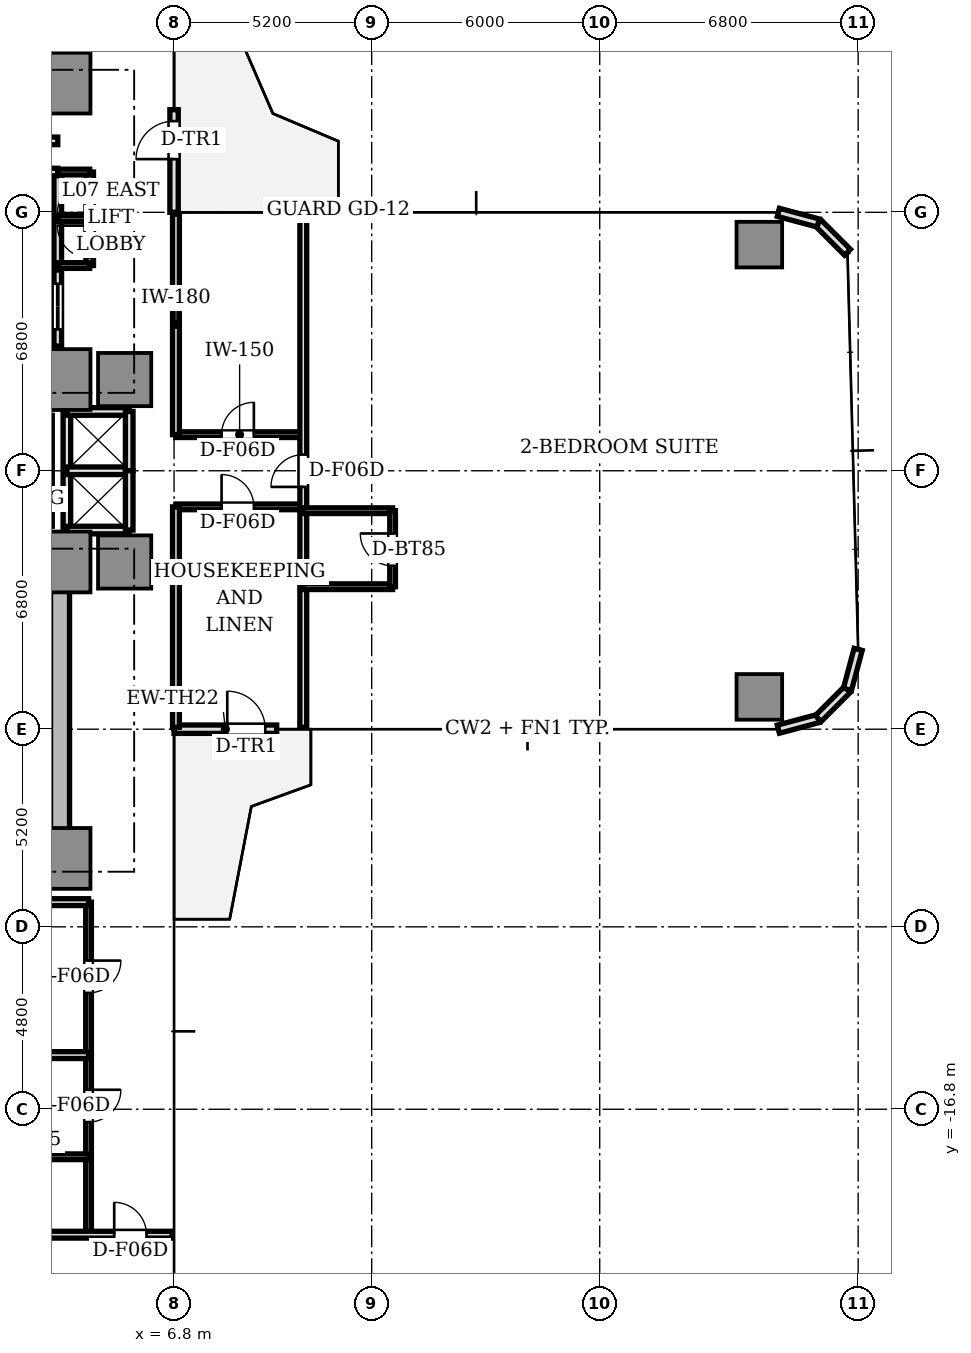
"""IFC4 building model, lengths in metres.
Left out: names, types, materials, properties, quantities, classifications, styles, units other than length and angle.
Written with IfcOpenShell. Run it as: python <this file> out.ifc"""

import sys

from ifc_helpers import new_model, si_unit, direction, frame, frame_2d, origin, origin_2d, place, context, subcontext, project, spatial, rectangle, extrude, source, transform, mapped, element, fill, save


model = new_model("IFC4")
c1 = context("Model", 3, precision=1e-05, world=origin(), true_north=direction((0.0, 1.0)))
c2 = subcontext(c1, "Body", "Model", "MODEL_VIEW")
j1 = project(units=[si_unit("LENGTHUNIT", "METRE"), si_unit("PLANEANGLEUNIT", "RADIAN")], contexts=[c1])
p1 = place(None, origin())
s1 = spatial("IfcSite", under=j1, at=p1, CompositionType="ELEMENT")
p2 = place(p1, origin())
s2 = spatial("IfcBuilding", under=s1, at=p2, CompositionType="ELEMENT")
p3 = place(p2, frame((0.0, 0.0, 29.8)))
s3 = spatial("IfcBuildingStorey", under=s2, at=p3, CompositionType="ELEMENT", Elevation=29.8)
p4 = place(p3, frame((3.8, -9.75, 0.0), z_axis=(0.0, 0.0, 1.0), x_axis=(0.0, 1.0, 0.0)))
e1 = element("IfcWall", 1, at=p4, inside=s3, PredefinedType="SHEAR", context=c2, shape_type="SweptSolid", body=[
    extrude(rectangle(XDim=6.9, YDim=0.5, at=frame_2d((3.45, 0.0))), origin(), (0.0, 0.0, 1.0), 3.11),
])
m1 = source(origin(), c2, "Body", "SweptSolid", [
    extrude(rectangle(XDim=1.6, YDim=1.6, at=origin_2d()), origin(), (0.0, 0.0, 1.0), 3.11),
])
for number, where, z_axis, x_axis in (
    (2, (3.8, 2.4, 0.0), (0.0, 0.0, 1.0), (1.0, 0.0, 0.0)),
    (3, (3.8, 10.2, 0.0), (0.0, 0.0, 1.0), (1.0, 0.0, 0.0)),
    (4, (3.8, -2.4, 0.0), (0.0, 0.0, 1.0), (1.0, 0.0, 0.0)),
    (5, (3.8, -10.2, 0.0), (0.0, 0.0, 1.0), (1.0, 0.0, 0.0)),
):
    element("IfcColumn", number, at=place(p3, frame(where, z_axis=z_axis, x_axis=x_axis)), inside=s3, PredefinedType="COLUMN", context=c2, shape_type="MappedRepresentation", body=[
        mapped(m1, transform((0.0, 0.0, 0.0), scale=1.0)),
    ])
m2 = source(origin(), c2, "Body", "SweptSolid", [
    extrude(rectangle(XDim=1.4, YDim=1.4, at=origin_2d()), origin(), (0.0, 0.0, 1.0), 3.11),
])
for number, where, z_axis, x_axis in (
    (6, (5.5, 2.4, 0.0), (0.0, 0.0, 1.0), (1.0, 0.0, 0.0)),
    (7, (5.5, -2.4, 0.0), (0.0, 0.0, 1.0), (1.0, 0.0, 0.0)),
):
    element("IfcColumn", number, at=place(p3, frame(where, z_axis=z_axis, x_axis=x_axis)), inside=s3, PredefinedType="COLUMN", context=c2, shape_type="MappedRepresentation", body=[
        mapped(m2, transform((0.0, 0.0, 0.0), scale=1.0)),
    ])
m3 = source(origin(), c2, "Body", "SweptSolid", [
    extrude(rectangle(XDim=1.2, YDim=1.2, at=origin_2d()), origin(), (0.0, 0.0, 1.0), 3.11),
])
for number, where, z_axis, x_axis in (
    (8, (22.2, -5.95, 0.0), (0.0, 0.0, 1.0), (1.0, 0.0, 0.0)),
    (9, (22.2, 5.95, 0.0), (0.0, 0.0, 1.0), (1.0, 0.0, 0.0)),
):
    element("IfcColumn", number, at=place(p3, frame(where, z_axis=z_axis, x_axis=x_axis)), inside=s3, PredefinedType="COLUMN", context=c2, shape_type="MappedRepresentation", body=[
        mapped(m3, transform((0.0, 0.0, 0.0), scale=1.0)),
    ])
p5 = place(p3, frame((6.8, -6.8, 0.0), z_axis=(0.0, 0.0, 1.0), x_axis=(1.0, 0.0, 0.0)))
e10 = element("IfcWall", 10, at=p5, inside=s3, PredefinedType="STANDARD", context=c2, shape_type="SweptSolid", body=[
    extrude(rectangle(XDim=2.7, YDim=0.22, at=frame_2d((1.35, 0.0))), origin(), (0.0, 0.0, 1.0), 3.11),
])
p6 = place(p5, frame((1.4, 0.0, 0.0)))
e11 = element("IfcOpeningElement", 11, at=p6, cuts=e10, PredefinedType="OPENING", context=c2, shape_type="SweptSolid", body=[
    extrude(rectangle(XDim=1.0, YDim=2.2, at=frame_2d((0.5, 1.1))), frame((0.0, 0.12, 0.0), z_axis=(0.0, -1.0, 0.0), x_axis=(1.0, 0.0, 0.0)), (0.0, 0.0, 1.0), 0.24),
])
for number, where, z_axis, x_axis in (
    (12, (22.7, -6.8, 0.0), (0.0, 0.0, 1.0), (0.966, 0.259, 0.0)),
    (13, (23.75, -6.519, 0.0), (0.0, 0.0, 1.0), (0.707, 0.707, 0.0)),
    (14, (24.519, -5.75, 0.0), (0.0, 0.0, 1.0), (0.259, 0.966, 0.0)),
    (15, (24.519, 5.75, 0.0), (0.0, 0.0, 1.0), (-0.707, 0.707, 0.0)),
    (16, (23.75, 6.519, 0.0), (0.0, 0.0, 1.0), (-0.966, 0.259, 0.0)),
):
    element("IfcWall", number, at=place(p3, frame(where, z_axis=z_axis, x_axis=x_axis)), inside=s3, PredefinedType="STANDARD", context=c2, shape_type="SweptSolid", body=[
        extrude(rectangle(XDim=1.087, YDim=0.22, at=frame_2d((0.543, 0.0))), origin(), (0.0, 0.0, 1.0), 3.11),
    ])
p7 = place(p3, frame((6.8, 6.8, 0.0), z_axis=(0.0, 0.0, 1.0), x_axis=(0.0, 1.0, 0.0)))
e17 = element("IfcWall", 17, at=p7, inside=s3, PredefinedType="STANDARD", context=c2, shape_type="SweptSolid", body=[
    extrude(rectangle(XDim=2.7, YDim=0.22, at=frame_2d((1.35, 0.0))), origin(), (0.0, 0.0, 1.0), 3.11),
])
p8 = place(p7, frame((1.4, 0.0, 0.0)))
e18 = element("IfcOpeningElement", 18, at=p8, cuts=e17, PredefinedType="OPENING", context=c2, shape_type="SweptSolid", body=[
    extrude(rectangle(XDim=1.0, YDim=2.2, at=frame_2d((0.5, 1.1))), frame((0.0, 0.12, 0.0), z_axis=(0.0, -1.0, 0.0), x_axis=(1.0, 0.0, 0.0)), (0.0, 0.0, 1.0), 0.24),
])
p9 = place(p3, frame((0.0, -2.5, 0.0), z_axis=(0.0, 0.0, 1.0), x_axis=(1.0, 0.0, 0.0)))
e19 = element("IfcWall", 19, at=p9, inside=s3, PredefinedType="SOLIDWALL", context=c2, shape_type="SweptSolid", body=[
    extrude(rectangle(XDim=3.72, YDim=0.2, at=frame_2d((1.86, 0.0))), origin(), (0.0, 0.0, 1.0), 3.11),
])
p10 = place(p3, frame((3.74, 3.28, 0.0), z_axis=(0.0, 0.0, 1.0), x_axis=(0.0, 1.0, 0.0)))
e20 = element("IfcWall", 20, at=p10, inside=s3, PredefinedType="SOLIDWALL", context=c2, shape_type="SweptSolid", body=[
    extrude(rectangle(XDim=2.08, YDim=0.2, at=frame_2d((1.04, 0.0))), origin(), (0.0, 0.0, 1.0), 2.66),
])
p11 = place(p10, frame((0.44, 0.0, 0.0)))
e21 = element("IfcOpeningElement", 21, at=p11, cuts=e20, PredefinedType="OPENING", context=c2, shape_type="SweptSolid", body=[
    extrude(rectangle(XDim=1.2, YDim=2.2, at=frame_2d((0.6, 1.1))), frame((0.0, 0.11, 0.0), z_axis=(0.0, -1.0, 0.0), x_axis=(1.0, 0.0, 0.0)), (0.0, 0.0, 1.0), 0.22),
])
p12 = place(p3, frame((0.05, 5.38, 0.0), z_axis=(0.0, 0.0, 1.0), x_axis=(1.0, 0.0, 0.0)))
e22 = element("IfcWall", 22, at=p12, inside=s3, PredefinedType="SOLIDWALL", context=c2, shape_type="SweptSolid", body=[
    extrude(rectangle(XDim=3.69, YDim=0.2, at=frame_2d((1.845, 0.0))), origin(), (0.0, 0.0, 1.0), 2.66),
])
p13 = place(p3, frame((3.74, 5.38, 0.0), z_axis=(0.0, 0.0, 1.0), x_axis=(0.0, 1.0, 0.0)))
e23 = element("IfcWall", 23, at=p13, inside=s3, PredefinedType="SOLIDWALL", context=c2, shape_type="SweptSolid", body=[
    extrude(rectangle(XDim=2.48, YDim=0.2, at=frame_2d((1.24, 0.0))), origin(), (0.0, 0.0, 1.0), 2.66),
])
p14 = place(p3, frame((1.9, 7.86, 0.0), z_axis=(0.0, 0.0, 1.0), x_axis=(1.0, 0.0, 0.0)))
e24 = element("IfcWall", 24, at=p14, inside=s3, PredefinedType="SOLIDWALL", context=c2, shape_type="SweptSolid", body=[
    extrude(rectangle(XDim=1.84, YDim=0.2, at=frame_2d((0.92, 0.0))), origin(), (0.0, 0.0, 1.0), 2.66),
])
p15 = place(p14, frame((0.36, 0.0, 0.0)))
e25 = element("IfcOpeningElement", 25, at=p15, cuts=e24, PredefinedType="OPENING", context=c2, shape_type="SweptSolid", body=[
    extrude(rectangle(XDim=1.1, YDim=2.2, at=frame_2d((0.55, 1.1))), frame((0.0, 0.11, 0.0), z_axis=(0.0, -1.0, 0.0), x_axis=(1.0, 0.0, 0.0)), (0.0, 0.0, 1.0), 0.22),
])
p16 = place(p3, frame((3.98, -1.56, 0.0), z_axis=(0.0, 0.0, 1.0), x_axis=(0.0, 1.0, 0.0)))
e26 = element("IfcWall", 26, at=p16, inside=s3, PredefinedType="SOLIDWALL", context=c2, shape_type="SweptSolid", body=[
    extrude(rectangle(XDim=3.12, YDim=0.2, at=frame_2d((1.56, 0.0))), origin(), (0.0, 0.0, 1.0), 2.18),
])
for number, where, z_axis, x_axis in (
    (27, (3.98, 1.56, 0.0), (0.0, 0.0, 1.0), (1.0, 0.0, 0.0)),
    (28, (3.98, -1.56, 0.0), (0.0, 0.0, 1.0), (1.0, 0.0, 0.0)),
    (29, (3.98, 0.0, 0.0), (0.0, 0.0, 1.0), (1.0, 0.0, 0.0)),
):
    element("IfcWall", number, at=place(p3, frame(where, z_axis=z_axis, x_axis=x_axis)), inside=s3, PredefinedType="SOLIDWALL", context=c2, shape_type="SweptSolid", body=[
        extrude(rectangle(XDim=1.64, YDim=0.2, at=frame_2d((0.82, 0.0))), origin(), (0.0, 0.0, 1.0), 2.66),
    ])
for number, where, z_axis, x_axis in (
    (30, (5.62, 0.0, 0.0), (0.0, 0.0, 1.0), (0.0, 1.0, 0.0)),
    (31, (5.62, -1.56, 0.0), (0.0, 0.0, 1.0), (0.0, 1.0, 0.0)),
):
    element("IfcWall", number, at=place(p3, frame(where, z_axis=z_axis, x_axis=x_axis)), inside=s3, PredefinedType="SOLIDWALL", context=c2, shape_type="SweptSolid", body=[
        extrude(rectangle(XDim=1.56, YDim=0.2, at=frame_2d((0.78, 0.0))), origin(), (0.0, 0.0, 1.0), 2.66),
    ])
p17 = place(p3, frame((0.12, 8.68, 0.0), z_axis=(0.0, 0.0, 1.0), x_axis=(1.0, 0.0, 0.0)))
e32 = element("IfcWall", 32, at=p17, inside=s3, PredefinedType="SOLIDWALL", context=c2, shape_type="SweptSolid", body=[
    extrude(rectangle(XDim=3.62, YDim=0.2, at=frame_2d((1.81, 0.0))), origin(), (0.0, 0.0, 1.0), 2.66),
])
p18 = place(p17, frame((1.75, 0.0, 0.0)))
e33 = element("IfcOpeningElement", 33, at=p18, cuts=e32, PredefinedType="OPENING", context=c2, shape_type="SweptSolid", body=[
    extrude(rectangle(XDim=0.95, YDim=2.15, at=frame_2d((0.475, 1.075))), frame((0.0, 0.11, 0.0), z_axis=(0.0, -1.0, 0.0), x_axis=(1.0, 0.0, 0.0)), (0.0, 0.0, 1.0), 0.22),
])
p19 = place(p3, frame((4.58, 5.4, 0.0), z_axis=(0.0, 0.0, 1.0), x_axis=(0.0, 1.0, 0.0)))
e34 = element("IfcWall", 34, at=p19, inside=s3, PredefinedType="SOLIDWALL", context=c2, shape_type="SweptSolid", body=[
    extrude(rectangle(XDim=2.46, YDim=0.2, at=frame_2d((1.23, 0.0))), origin(), (0.0, 0.0, 1.0), 2.66),
])
p20 = place(p19, frame((0.2, 0.0, 0.0)))
e35 = element("IfcOpeningElement", 35, at=p20, cuts=e34, PredefinedType="OPENING", context=c2, shape_type="SweptSolid", body=[
    extrude(rectangle(XDim=0.85, YDim=2.1, at=frame_2d((0.425, 1.05))), frame((0.0, 0.11, 0.0), z_axis=(0.0, -1.0, 0.0), x_axis=(1.0, 0.0, 0.0)), (0.0, 0.0, 1.0), 0.22),
])
p21 = place(p19, frame((1.38, 0.0, 0.0)))
e36 = element("IfcOpeningElement", 36, at=p21, cuts=e34, PredefinedType="OPENING", context=c2, shape_type="SweptSolid", body=[
    extrude(rectangle(XDim=0.85, YDim=2.1, at=frame_2d((0.425, 1.05))), frame((0.0, 0.11, 0.0), z_axis=(0.0, -1.0, 0.0), x_axis=(1.0, 0.0, 0.0)), (0.0, 0.0, 1.0), 0.22),
])
for number, where, z_axis, x_axis in (
    (37, (3.74, 5.4, 0.0), (0.0, 0.0, 1.0), (1.0, 0.0, 0.0)),
    (38, (3.74, 7.86, 0.0), (0.0, 0.0, 1.0), (1.0, 0.0, 0.0)),
    (39, (3.74, 6.63, 0.0), (0.0, 0.0, 1.0), (1.0, 0.0, 0.0)),
):
    element("IfcWall", number, at=place(p3, frame(where, z_axis=z_axis, x_axis=x_axis)), inside=s3, PredefinedType="PARTITIONING", context=c2, shape_type="SweptSolid", body=[
        extrude(rectangle(XDim=0.84, YDim=0.15, at=frame_2d((0.42, 0.0))), origin(), (0.0, 0.0, 1.0), 2.66),
    ])
p22 = place(p3, frame((6.85, 0.95, 0.0), z_axis=(0.0, 0.0, 1.0), x_axis=(1.0, 0.0, 0.0)))
e40 = element("IfcWall", 40, at=p22, inside=s3, PredefinedType="PARTITIONING", context=c2, shape_type="SweptSolid", body=[
    extrude(rectangle(XDim=3.35, YDim=0.15, at=frame_2d((1.675, 0.0))), origin(), (0.0, 0.0, 1.0), 2.66),
])
p23 = place(p22, frame((1.2, 0.0, 0.0)))
e41 = element("IfcOpeningElement", 41, at=p23, cuts=e40, PredefinedType="OPENING", context=c2, shape_type="SweptSolid", body=[
    extrude(rectangle(XDim=0.85, YDim=2.1, at=frame_2d((0.425, 1.05))), frame((0.0, 0.085, 0.0), z_axis=(0.0, -1.0, 0.0), x_axis=(1.0, 0.0, 0.0)), (0.0, 0.0, 1.0), 0.17),
])
p24 = place(p3, frame((6.85, -0.95, 0.0), z_axis=(0.0, 0.0, 1.0), x_axis=(1.0, 0.0, 0.0)))
e42 = element("IfcWall", 42, at=p24, inside=s3, PredefinedType="PARTITIONING", context=c2, shape_type="SweptSolid", body=[
    extrude(rectangle(XDim=3.35, YDim=0.15, at=frame_2d((1.675, 0.0))), origin(), (0.0, 0.0, 1.0), 2.66),
])
p25 = place(p24, frame((1.2, 0.0, 0.0)))
e43 = element("IfcOpeningElement", 43, at=p25, cuts=e42, PredefinedType="OPENING", context=c2, shape_type="SweptSolid", body=[
    extrude(rectangle(XDim=0.85, YDim=2.1, at=frame_2d((0.425, 1.05))), frame((0.0, 0.085, 0.0), z_axis=(0.0, -1.0, 0.0), x_axis=(1.0, 0.0, 0.0)), (0.0, 0.0, 1.0), 0.17),
])
for number, where, z_axis, x_axis in (
    (44, (6.85, 0.95, 0.0), (0.0, 0.0, 1.0), (0.0, 1.0, 0.0)),
    (45, (6.85, -6.75, 0.0), (0.0, 0.0, 1.0), (0.0, 1.0, 0.0)),
):
    element("IfcWall", number, at=place(p3, frame(where, z_axis=z_axis, x_axis=x_axis)), inside=s3, PredefinedType="PARTITIONING", context=c2, shape_type="SweptSolid", body=[
        extrude(rectangle(XDim=5.8, YDim=0.18, at=frame_2d((2.9, 0.0))), origin(), (0.0, 0.0, 1.0), 2.66),
    ])
p26 = place(p3, frame((10.2, -6.75, 0.0), z_axis=(0.0, 0.0, 1.0), x_axis=(0.0, 1.0, 0.0)))
e46 = element("IfcWall", 46, at=p26, inside=s3, PredefinedType="PARTITIONING", context=c2, shape_type="SweptSolid", body=[
    extrude(rectangle(XDim=13.5, YDim=0.18, at=frame_2d((6.75, 0.0))), origin(), (0.0, 0.0, 1.0), 2.66),
])
p27 = place(p26, frame((6.325, 0.0, 0.0)))
e47 = element("IfcOpeningElement", 47, at=p27, cuts=e46, PredefinedType="OPENING", context=c2, shape_type="SweptSolid", body=[
    extrude(rectangle(XDim=0.85, YDim=2.1, at=frame_2d((0.425, 1.05))), frame((0.0, 0.1, 0.0), z_axis=(0.0, -1.0, 0.0), x_axis=(1.0, 0.0, 0.0)), (0.0, 0.0, 1.0), 0.2),
])
p28 = place(p3, frame((10.2, -1.05, 0.0), z_axis=(0.0, 0.0, 1.0), x_axis=(1.0, 0.0, 0.0)))
e48 = element("IfcWall", 48, at=p28, inside=s3, PredefinedType="PARTITIONING", context=c2, shape_type="SweptSolid", body=[
    extrude(rectangle(XDim=2.35, YDim=0.15, at=frame_2d((1.175, 0.0))), origin(), (0.0, 0.0, 1.0), 2.66),
])
p29 = place(p3, frame((10.2, -3.05, 0.0), z_axis=(0.0, 0.0, 1.0), x_axis=(1.0, 0.0, 0.0)))
e49 = element("IfcWall", 49, at=p29, inside=s3, PredefinedType="PARTITIONING", context=c2, shape_type="SweptSolid", body=[
    extrude(rectangle(XDim=2.35, YDim=0.15, at=frame_2d((1.175, 0.0))), origin(), (0.0, 0.0, 1.0), 2.63),
])
p30 = place(p3, frame((12.55, -3.05, 0.0), z_axis=(0.0, 0.0, 1.0), x_axis=(0.0, 1.0, 0.0)))
e50 = element("IfcWall", 50, at=p30, inside=s3, PredefinedType="PARTITIONING", context=c2, shape_type="SweptSolid", body=[
    extrude(rectangle(XDim=2.0, YDim=0.15, at=frame_2d((1.0, 0.0))), origin(), (0.0, 0.0, 1.0), 2.66),
])
p31 = place(p30, frame((0.55, 0.0, 0.0)))
e51 = element("IfcOpeningElement", 51, at=p31, cuts=e50, PredefinedType="OPENING", context=c2, shape_type="SweptSolid", body=[
    extrude(rectangle(XDim=0.85, YDim=2.1, at=frame_2d((0.425, 1.05))), frame((0.0, 0.085, 0.0), z_axis=(0.0, -1.0, 0.0), x_axis=(1.0, 0.0, 0.0)), (0.0, 0.0, 1.0), 0.17),
])
p32 = place(p3, frame((4.55, -11.35, 0.0), z_axis=(0.0, 0.0, 1.0), x_axis=(0.0, -1.0, 0.0)))
e52 = element("IfcWall", 52, at=p32, inside=s3, PredefinedType="PARTITIONING", context=c2, shape_type="SweptSolid", body=[
    extrude(rectangle(XDim=8.75, YDim=0.15, at=frame_2d((4.375, 0.0))), origin(), (0.0, 0.0, 1.0), 2.63),
])
p33 = place(p32, frame((1.538, 0.0, 0.0)))
e53 = element("IfcOpeningElement", 53, at=p33, cuts=e52, PredefinedType="OPENING", context=c2, shape_type="SweptSolid", body=[
    extrude(rectangle(XDim=0.85, YDim=2.1, at=frame_2d((0.425, 1.05))), frame((0.0, 0.085, 0.0), z_axis=(0.0, -1.0, 0.0), x_axis=(1.0, 0.0, 0.0)), (0.0, 0.0, 1.0), 0.17),
])
p34 = place(p32, frame((4.937, 0.0, 0.0)))
e54 = element("IfcOpeningElement", 54, at=p34, cuts=e52, PredefinedType="OPENING", context=c2, shape_type="SweptSolid", body=[
    extrude(rectangle(XDim=0.85, YDim=2.1, at=frame_2d((0.425, 1.05))), frame((0.0, 0.085, 0.0), z_axis=(0.0, -1.0, 0.0), x_axis=(1.0, 0.0, 0.0)), (0.0, 0.0, 1.0), 0.17),
])
for number, where, z_axis, x_axis in (
    (55, (-6.75, -11.35, 0.0), (0.0, 0.0, 1.0), (1.0, 0.0, 0.0)),
    (56, (4.55, -15.375, 0.0), (0.0, 0.0, 1.0), (-1.0, 0.0, 0.0)),
):
    element("IfcWall", number, at=place(p3, frame(where, z_axis=z_axis, x_axis=x_axis)), inside=s3, PredefinedType="PARTITIONING", context=c2, shape_type="SweptSolid", body=[
        extrude(rectangle(XDim=11.3, YDim=0.18, at=frame_2d((5.65, 0.0))), origin(), (0.0, 0.0, 1.0), 2.66),
    ])
p35 = place(p3, frame((4.55, -18.05, 0.0), z_axis=(0.0, 0.0, 1.0), x_axis=(-1.0, 0.0, 0.0)))
e57 = element("IfcWall", 57, at=p35, inside=s3, PredefinedType="PARTITIONING", context=c2, shape_type="SweptSolid", body=[
    extrude(rectangle(XDim=2.45, YDim=0.15, at=frame_2d((1.225, 0.0))), origin(), (0.0, 0.0, 1.0), 2.66),
])
p36 = place(p35, frame((1.25, 0.0, 0.0)))
e58 = element("IfcOpeningElement", 58, at=p36, cuts=e57, PredefinedType="OPENING", context=c2, shape_type="SweptSolid", body=[
    extrude(rectangle(XDim=0.85, YDim=2.1, at=frame_2d((0.425, 1.05))), frame((0.0, 0.085, 0.0), z_axis=(0.0, -1.0, 0.0), x_axis=(1.0, 0.0, 0.0)), (0.0, 0.0, 1.0), 0.17),
])
p37 = place(p3, frame((-6.75, -20.1, 0.0), z_axis=(0.0, 0.0, 1.0), x_axis=(1.0, 0.0, 0.0)))
e59 = element("IfcWall", 59, at=p37, inside=s3, PredefinedType="PARTITIONING", context=c2, shape_type="SweptSolid", body=[
    extrude(rectangle(XDim=13.5, YDim=0.18, at=frame_2d((6.75, 0.0))), origin(), (0.0, 0.0, 1.0), 2.66),
])
p38 = place(p37, frame((11.975, 0.0, 0.0)))
e60 = element("IfcOpeningElement", 60, at=p38, cuts=e59, PredefinedType="OPENING", context=c2, shape_type="SweptSolid", body=[
    extrude(rectangle(XDim=0.85, YDim=2.1, at=frame_2d((0.425, 1.05))), frame((0.0, 0.1, 0.0), z_axis=(0.0, -1.0, 0.0), x_axis=(1.0, 0.0, 0.0)), (0.0, 0.0, 1.0), 0.2),
])
m4 = source(origin(), c2, "Body", "SweptSolid", [
    extrude(rectangle(XDim=1.0, YDim=0.05, at=origin_2d()), origin(), (0.0, 0.0, 1.0), 2.2),
])
p39 = place(p6, frame((0.5, 0.0, 0.0)))
e61 = element("IfcDoor", 61, at=p39, inside=s3, OperationType="SINGLE_SWING_LEFT", PredefinedType="DOOR", context=c2, shape_type="MappedRepresentation", body=[
    mapped(m4, transform((0.0, 0.0, 0.0), scale=1.0)),
])
fill(e11, e61)
p40 = place(p8, frame((0.5, 0.0, 0.0)))
e62 = element("IfcDoor", 62, at=p40, inside=s3, OperationType="SINGLE_SWING_LEFT", PredefinedType="DOOR", context=c2, shape_type="MappedRepresentation", body=[
    mapped(m4, transform((0.0, 0.0, 0.0), scale=1.0)),
])
fill(e18, e62)
m5 = source(origin(), c2, "Body", "SweptSolid", [
    extrude(rectangle(XDim=1.2, YDim=0.05, at=origin_2d()), origin(), (0.0, 0.0, 1.0), 2.2),
])
p41 = place(p11, frame((0.6, 0.0, 0.0)))
e63 = element("IfcDoor", 63, at=p41, inside=s3, OperationType="DOUBLE_DOOR_SLIDING", PredefinedType="DOOR", context=c2, shape_type="MappedRepresentation", body=[
    mapped(m5, transform((0.0, 0.0, 0.0), scale=1.0)),
])
fill(e21, e63)
m6 = source(origin(), c2, "Body", "SweptSolid", [
    extrude(rectangle(XDim=0.85, YDim=0.05, at=origin_2d()), origin(), (0.0, 0.0, 1.0), 2.1),
])
p42 = place(p20, frame((0.425, 0.0, 0.0)))
e64 = element("IfcDoor", 64, at=p42, inside=s3, OperationType="SINGLE_SWING_RIGHT", PredefinedType="DOOR", context=c2, shape_type="MappedRepresentation", body=[
    mapped(m6, transform((0.0, 0.0, 0.0), scale=1.0)),
])
fill(e35, e64)
p43 = place(p21, frame((0.425, 0.0, 0.0)))
e65 = element("IfcDoor", 65, at=p43, inside=s3, OperationType="SINGLE_SWING_LEFT", PredefinedType="DOOR", context=c2, shape_type="MappedRepresentation", body=[
    mapped(m6, transform((0.0, 0.0, 0.0), scale=1.0)),
])
fill(e36, e65)
p44 = place(p23, frame((0.425, 0.0, 0.0)))
e66 = element("IfcDoor", 66, at=p44, inside=s3, OperationType="SINGLE_SWING_RIGHT", PredefinedType="DOOR", context=c2, shape_type="MappedRepresentation", body=[
    mapped(m6, transform((0.0, 0.0, 0.0), scale=1.0)),
])
fill(e41, e66)
p45 = place(p25, frame((0.425, 0.0, 0.0)))
e67 = element("IfcDoor", 67, at=p45, inside=s3, OperationType="SINGLE_SWING_LEFT", PredefinedType="DOOR", context=c2, shape_type="MappedRepresentation", body=[
    mapped(m6, transform((0.0, 0.0, 0.0), scale=1.0)),
])
fill(e43, e67)
p46 = place(p31, frame((0.425, 0.0, 0.0)))
e68 = element("IfcDoor", 68, at=p46, inside=s3, OperationType="SINGLE_SWING_RIGHT", PredefinedType="DOOR", context=c2, shape_type="MappedRepresentation", body=[
    mapped(m6, transform((0.0, 0.0, 0.0), scale=1.0)),
])
fill(e51, e68)
p47 = place(p27, frame((0.425, 0.0, 0.0)))
e69 = element("IfcDoor", 69, at=p47, inside=s3, OperationType="SINGLE_SWING_LEFT", PredefinedType="DOOR", context=c2, shape_type="MappedRepresentation", body=[
    mapped(m6, transform((0.0, 0.0, 0.0), scale=1.0)),
])
fill(e47, e69)
p48 = place(p33, frame((0.425, 0.0, 0.0)))
e70 = element("IfcDoor", 70, at=p48, inside=s3, OperationType="SINGLE_SWING_LEFT", PredefinedType="DOOR", context=c2, shape_type="MappedRepresentation", body=[
    mapped(m6, transform((0.0, 0.0, 0.0), scale=1.0)),
])
fill(e53, e70)
p49 = place(p34, frame((0.425, 0.0, 0.0)))
e71 = element("IfcDoor", 71, at=p49, inside=s3, OperationType="SINGLE_SWING_LEFT", PredefinedType="DOOR", context=c2, shape_type="MappedRepresentation", body=[
    mapped(m6, transform((0.0, 0.0, 0.0), scale=1.0)),
])
fill(e54, e71)
p50 = place(p38, frame((0.425, 0.0, 0.0)))
e72 = element("IfcDoor", 72, at=p50, inside=s3, OperationType="SINGLE_SWING_LEFT", PredefinedType="DOOR", context=c2, shape_type="MappedRepresentation", body=[
    mapped(m6, transform((0.0, 0.0, 0.0), scale=1.0)),
])
fill(e60, e72)
save(model, sys.argv[1])
